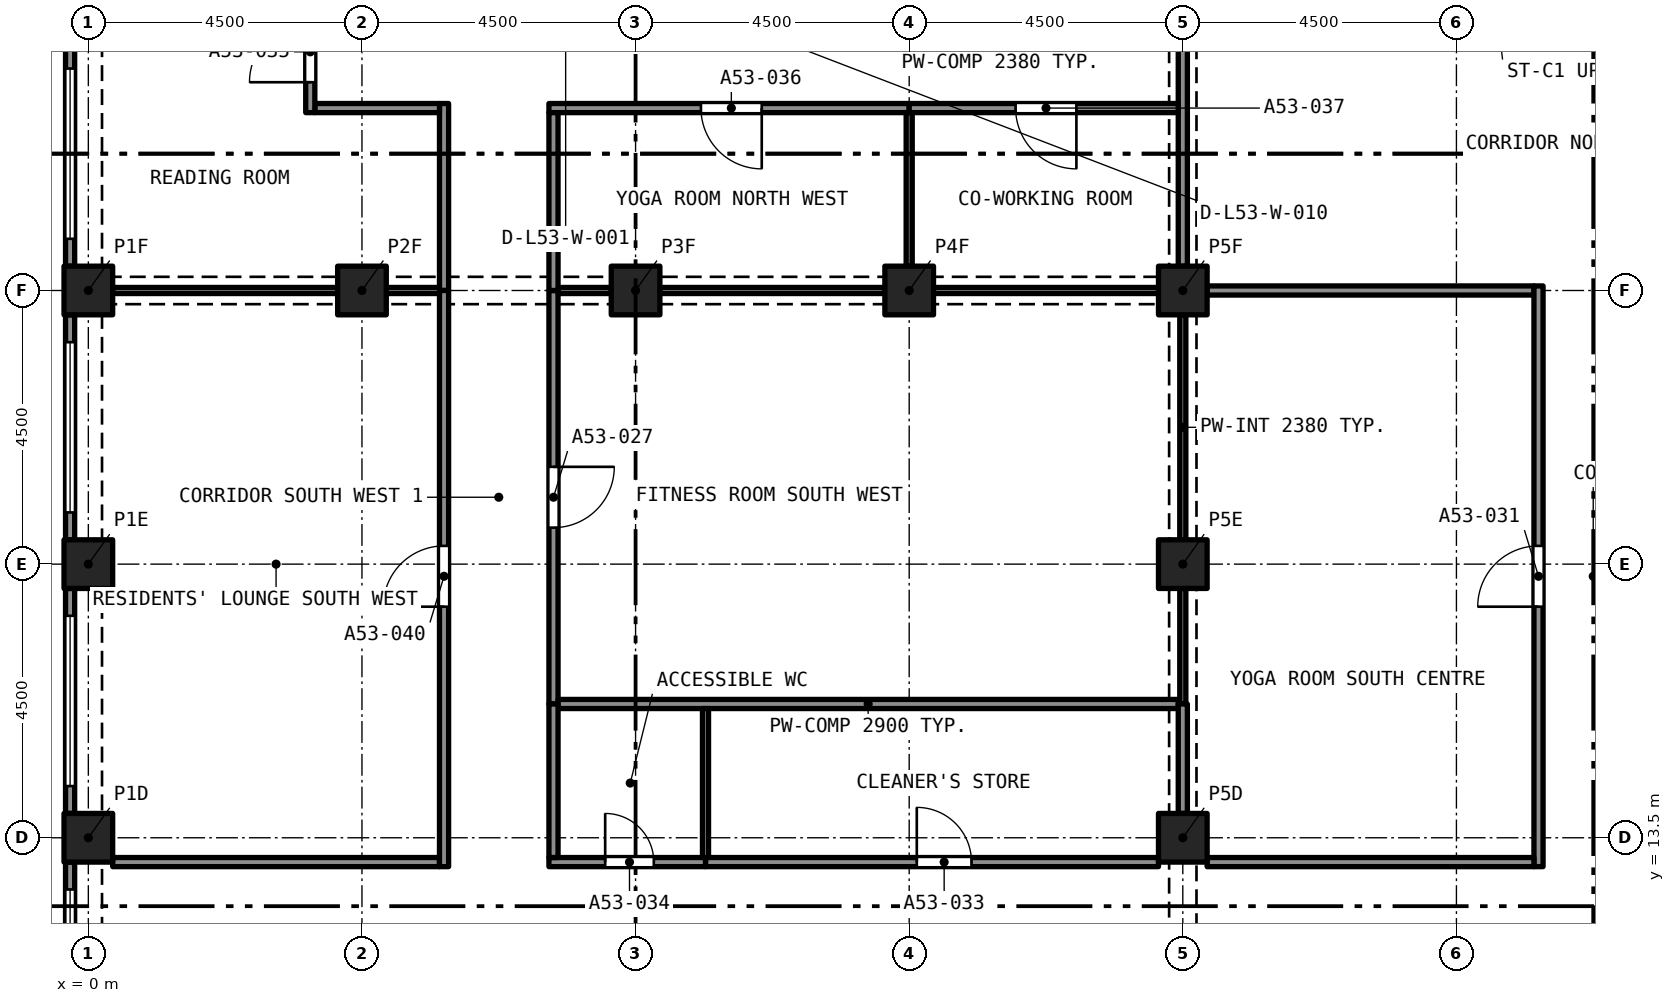
"""IFC4 building model, lengths in metres.
Left out: names, types, materials, properties, quantities, classifications, styles, units other than length and angle.
Written with IfcOpenShell. Run it as: python <this file> out.ifc"""

import sys

from ifc_helpers import new_model, si_unit, direction, frame, frame_2d, origin, origin_2d, place, context, subcontext, project, spatial, rectangle, extrude, element, fill, save


model = new_model("IFC4")
c1 = context("Model", 3, precision=1e-05, world=origin(), true_north=direction((0.0, 1.0)))
c2 = subcontext(c1, "Body", "Model", "MODEL_VIEW")
j1 = project(units=[si_unit("LENGTHUNIT", "METRE"), si_unit("PLANEANGLEUNIT", "RADIAN")], contexts=[c1])
p1 = place(None, origin())
s1 = spatial("IfcSite", under=j1, at=p1, CompositionType="ELEMENT")
p2 = place(p1, origin())
s2 = spatial("IfcBuilding", under=s1, at=p2, CompositionType="ELEMENT")
p3 = place(p2, frame((0.0, 0.0, 192.3)))
s3 = spatial("IfcBuildingStorey", under=s2, at=p3, CompositionType="ELEMENT", Elevation=192.3)
for number, where, z_axis, x_axis in (
    (1, (0.0, 13.5, 0.0), (0.0, 0.0, 1.0), (1.0, 0.0, 0.0)),
    (2, (18.0, 13.5, 0.0), (0.0, 0.0, 1.0), (1.0, 0.0, 0.0)),
    (3, (0.0, 18.0, 0.0), (0.0, 0.0, 1.0), (1.0, 0.0, 0.0)),
    (4, (18.0, 18.0, 0.0), (0.0, 0.0, 1.0), (1.0, 0.0, 0.0)),
    (5, (0.0, 22.5, 0.0), (0.0, 0.0, 1.0), (1.0, 0.0, 0.0)),
    (6, (4.5, 22.5, 0.0), (0.0, 0.0, 1.0), (1.0, 0.0, 0.0)),
    (7, (9.0, 22.5, 0.0), (0.0, 0.0, 1.0), (1.0, 0.0, 0.0)),
    (8, (13.5, 22.5, 0.0), (0.0, 0.0, 1.0), (1.0, 0.0, 0.0)),
    (9, (18.0, 22.5, 0.0), (0.0, 0.0, 1.0), (1.0, 0.0, 0.0)),
):
    element("IfcColumn", number, at=place(p3, frame(where, z_axis=z_axis, x_axis=x_axis)), inside=s3, PredefinedType="COLUMN", context=c2, shape_type="SweptSolid", body=[
        extrude(rectangle(XDim=0.8, YDim=0.8, at=origin_2d()), origin(), (0.0, 0.0, 1.0), 3.2),
    ])
p4 = place(p3, frame((-0.3, 22.9, 0.0), z_axis=(0.0, 0.0, 1.0), x_axis=(0.0, 1.0, 0.0)))
e10 = element("IfcWall", 10, at=p4, inside=s3, PredefinedType="SOLIDWALL", context=c2, shape_type="SweptSolid", body=[
    extrude(rectangle(XDim=3.7, YDim=0.15, at=frame_2d((1.85, 0.0))), origin(), (0.0, 0.0, 1.0), 3.2),
])
p5 = place(p4, frame((0.45, 0.0, 0.45)))
e11 = element("IfcOpeningElement", 11, at=p5, cuts=e10, PredefinedType="OPENING", context=c2, shape_type="SweptSolid", body=[
    extrude(rectangle(XDim=2.8, YDim=1.95, at=frame_2d((1.4, 0.975))), frame((0.0, 0.085, 0.0), z_axis=(0.0, -1.0, 0.0), x_axis=(1.0, 0.0, 0.0)), (0.0, 0.0, 1.0), 0.17),
])
p6 = place(p3, frame((-0.3, 18.4, 0.0), z_axis=(0.0, 0.0, 1.0), x_axis=(0.0, 1.0, 0.0)))
e12 = element("IfcWall", 12, at=p6, inside=s3, PredefinedType="SOLIDWALL", context=c2, shape_type="SweptSolid", body=[
    extrude(rectangle(XDim=3.7, YDim=0.15, at=frame_2d((1.85, 0.0))), origin(), (0.0, 0.0, 1.0), 3.2),
])
p7 = place(p6, frame((0.45, 0.0, 0.45)))
e13 = element("IfcOpeningElement", 13, at=p7, cuts=e12, PredefinedType="OPENING", context=c2, shape_type="SweptSolid", body=[
    extrude(rectangle(XDim=2.8, YDim=1.95, at=frame_2d((1.4, 0.975))), frame((0.0, 0.085, 0.0), z_axis=(0.0, -1.0, 0.0), x_axis=(1.0, 0.0, 0.0)), (0.0, 0.0, 1.0), 0.17),
])
p8 = place(p3, frame((-0.3, 13.9, 0.0), z_axis=(0.0, 0.0, 1.0), x_axis=(0.0, 1.0, 0.0)))
e14 = element("IfcWall", 14, at=p8, inside=s3, PredefinedType="SOLIDWALL", context=c2, shape_type="SweptSolid", body=[
    extrude(rectangle(XDim=3.7, YDim=0.15, at=frame_2d((1.85, 0.0))), origin(), (0.0, 0.0, 1.0), 3.2),
])
p9 = place(p8, frame((0.45, 0.0, 0.45)))
e15 = element("IfcOpeningElement", 15, at=p9, cuts=e14, PredefinedType="OPENING", context=c2, shape_type="SweptSolid", body=[
    extrude(rectangle(XDim=2.8, YDim=1.95, at=frame_2d((1.4, 0.975))), frame((0.0, 0.085, 0.0), z_axis=(0.0, -1.0, 0.0), x_axis=(1.0, 0.0, 0.0)), (0.0, 0.0, 1.0), 0.17),
])
p10 = place(p3, frame((-0.3, 9.4, 0.0), z_axis=(0.0, 0.0, 1.0), x_axis=(0.0, 1.0, 0.0)))
e16 = element("IfcWall", 16, at=p10, inside=s3, PredefinedType="SOLIDWALL", context=c2, shape_type="SweptSolid", body=[
    extrude(rectangle(XDim=3.7, YDim=0.15, at=frame_2d((1.85, 0.0))), origin(), (0.0, 0.0, 1.0), 3.2),
])
p11 = place(p10, frame((0.45, 0.0, 0.45)))
e17 = element("IfcOpeningElement", 17, at=p11, cuts=e16, PredefinedType="OPENING", context=c2, shape_type="SweptSolid", body=[
    extrude(rectangle(XDim=2.8, YDim=1.95, at=frame_2d((1.4, 0.975))), frame((0.0, 0.085, 0.0), z_axis=(0.0, -1.0, 0.0), x_axis=(1.0, 0.0, 0.0)), (0.0, 0.0, 1.0), 0.17),
])
p12 = place(p3, frame((18.0, 18.4, 0.0), z_axis=(0.0, 0.0, 1.0), x_axis=(0.0, 1.0, 0.0)))
e18 = element("IfcWall", 18, at=p12, inside=s3, PredefinedType="PARTITIONING", context=c2, shape_type="SweptSolid", body=[
    extrude(rectangle(XDim=3.7, YDim=0.1, at=frame_2d((1.85, 0.0))), origin(), (0.0, 0.0, 1.0), 2.38),
])
p13 = place(p3, frame((18.0, 15.7, 0.0), z_axis=(0.0, 0.0, 1.0), x_axis=(0.0, 1.0, 0.0)))
e19 = element("IfcWall", 19, at=p13, inside=s3, PredefinedType="PARTITIONING", context=c2, shape_type="SweptSolid", body=[
    extrude(rectangle(XDim=1.9, YDim=0.1, at=frame_2d((0.95, 0.0))), origin(), (0.0, 0.0, 1.0), 2.38),
])
p14 = place(p3, frame((7.65, 22.5, 0.0), z_axis=(0.0, 0.0, 1.0), x_axis=(0.0, -1.0, 0.0)))
e20 = element("IfcWall", 20, at=p14, inside=s3, PredefinedType="PARTITIONING", context=c2, shape_type="SweptSolid", body=[
    extrude(rectangle(XDim=6.8, YDim=0.15, at=frame_2d((3.4, 0.0))), origin(), (0.0, 0.0, 1.0), 2.9),
])
p15 = place(p14, frame((2.9, 0.0, 0.0)))
e21 = element("IfcOpeningElement", 21, at=p15, cuts=e20, PredefinedType="OPENING", context=c2, shape_type="SweptSolid", body=[
    extrude(rectangle(XDim=1.0, YDim=2.1, at=frame_2d((0.5, 1.05))), frame((0.0, 0.085, 0.0), z_axis=(0.0, -1.0, 0.0), x_axis=(1.0, 0.0, 0.0)), (0.0, 0.0, 1.0), 0.17),
])
p16 = place(p3, frame((7.725, 22.5, 0.0), z_axis=(0.0, 0.0, 1.0), x_axis=(1.0, 0.0, 0.0)))
e22 = element("IfcWall", 22, at=p16, inside=s3, PredefinedType="PARTITIONING", context=c2, shape_type="SweptSolid", body=[
    extrude(rectangle(XDim=0.875, YDim=0.1, at=frame_2d((0.438, 0.0))), origin(), (0.0, 0.0, 1.0), 2.38),
])
for number, where, z_axis, x_axis in (
    (23, (9.4, 22.5, 0.0), (0.0, 0.0, 1.0), (1.0, 0.0, 0.0)),
    (24, (13.9, 22.5, 0.0), (0.0, 0.0, 1.0), (1.0, 0.0, 0.0)),
):
    element("IfcWall", number, at=place(p3, frame(where, z_axis=z_axis, x_axis=x_axis)), inside=s3, PredefinedType="PARTITIONING", context=c2, shape_type="SweptSolid", body=[
        extrude(rectangle(XDim=3.7, YDim=0.1, at=frame_2d((1.85, 0.0))), origin(), (0.0, 0.0, 1.0), 2.38),
    ])
p17 = place(p3, frame((7.725, 15.7, 0.0), z_axis=(0.0, 0.0, 1.0), x_axis=(1.0, 0.0, 0.0)))
e25 = element("IfcWall", 25, at=p17, inside=s3, PredefinedType="PARTITIONING", context=c2, shape_type="SweptSolid", body=[
    extrude(rectangle(XDim=10.2, YDim=0.15, at=frame_2d((5.1, 0.0))), origin(), (0.0, 0.0, 1.0), 2.9),
])
p18 = place(p3, frame((18.4, 22.5, 0.0), z_axis=(0.0, 0.0, 1.0), x_axis=(1.0, 0.0, 0.0)))
e26 = element("IfcWall", 26, at=p18, inside=s3, PredefinedType="PARTITIONING", context=c2, shape_type="SweptSolid", body=[
    extrude(rectangle(XDim=5.375, YDim=0.15, at=frame_2d((2.688, 0.0))), origin(), (0.0, 0.0, 1.0), 2.75),
])
p19 = place(p3, frame((18.0, 22.9, 0.0), z_axis=(0.0, 0.0, 1.0), x_axis=(0.0, 1.0, 0.0)))
e27 = element("IfcWall", 27, at=p19, inside=s3, PredefinedType="PARTITIONING", context=c2, shape_type="SweptSolid", body=[
    extrude(rectangle(XDim=3.7, YDim=0.15, at=frame_2d((1.85, 0.0))), origin(), (0.0, 0.0, 1.0), 2.38),
])
p20 = place(p3, frame((23.85, 13.025, 0.0), z_axis=(0.0, 0.0, 1.0), x_axis=(0.0, 1.0, 0.0)))
e28 = element("IfcWall", 28, at=p20, inside=s3, PredefinedType="PARTITIONING", context=c2, shape_type="SweptSolid", body=[
    extrude(rectangle(XDim=9.55, YDim=0.15, at=frame_2d((4.775, 0.0))), origin(), (0.0, 0.0, 1.0), 2.75),
])
p21 = place(p20, frame((4.275, 0.0, 0.0)))
e29 = element("IfcOpeningElement", 29, at=p21, cuts=e28, PredefinedType="OPENING", context=c2, shape_type="SweptSolid", body=[
    extrude(rectangle(XDim=1.0, YDim=2.1, at=frame_2d((0.5, 1.05))), frame((0.0, 0.085, 0.0), z_axis=(0.0, -1.0, 0.0), x_axis=(1.0, 0.0, 0.0)), (0.0, 0.0, 1.0), 0.17),
])
p22 = place(p3, frame((18.4, 13.1, 0.0), z_axis=(0.0, 0.0, 1.0), x_axis=(1.0, 0.0, 0.0)))
e30 = element("IfcWall", 30, at=p22, inside=s3, PredefinedType="PARTITIONING", context=c2, shape_type="SweptSolid", body=[
    extrude(rectangle(XDim=5.375, YDim=0.15, at=frame_2d((2.688, 0.0))), origin(), (0.0, 0.0, 1.0), 2.75),
])
p23 = place(p3, frame((10.15, 13.1, 0.0), z_axis=(0.0, 0.0, 1.0), x_axis=(1.0, 0.0, 0.0)))
e31 = element("IfcWall", 31, at=p23, inside=s3, PredefinedType="PARTITIONING", context=c2, shape_type="SweptSolid", body=[
    extrude(rectangle(XDim=7.45, YDim=0.15, at=frame_2d((3.725, 0.0))), origin(), (0.0, 0.0, 1.0), 2.9),
])
p24 = place(p23, frame((3.475, 0.0, 0.0)))
e32 = element("IfcOpeningElement", 32, at=p24, cuts=e31, PredefinedType="OPENING", context=c2, shape_type="SweptSolid", body=[
    extrude(rectangle(XDim=0.9, YDim=2.1, at=frame_2d((0.45, 1.05))), frame((0.0, 0.085, 0.0), z_axis=(0.0, -1.0, 0.0), x_axis=(1.0, 0.0, 0.0)), (0.0, 0.0, 1.0), 0.17),
])
p25 = place(p3, frame((7.575, 13.1, 0.0), z_axis=(0.0, 0.0, 1.0), x_axis=(1.0, 0.0, 0.0)))
e33 = element("IfcWall", 33, at=p25, inside=s3, PredefinedType="PARTITIONING", context=c2, shape_type="SweptSolid", body=[
    extrude(rectangle(XDim=2.575, YDim=0.15, at=frame_2d((1.288, 0.0))), origin(), (0.0, 0.0, 1.0), 2.9),
])
p26 = place(p25, frame((0.925, 0.0, 0.0)))
e34 = element("IfcOpeningElement", 34, at=p26, cuts=e33, PredefinedType="OPENING", context=c2, shape_type="SweptSolid", body=[
    extrude(rectangle(XDim=0.8, YDim=2.1, at=frame_2d((0.4, 1.05))), frame((0.0, 0.085, 0.0), z_axis=(0.0, -1.0, 0.0), x_axis=(1.0, 0.0, 0.0)), (0.0, 0.0, 1.0), 0.17),
])
p27 = place(p3, frame((0.4, 13.1, 0.0), z_axis=(0.0, 0.0, 1.0), x_axis=(1.0, 0.0, 0.0)))
e35 = element("IfcWall", 35, at=p27, inside=s3, PredefinedType="PARTITIONING", context=c2, shape_type="SweptSolid", body=[
    extrude(rectangle(XDim=5.375, YDim=0.15, at=frame_2d((2.688, 0.0))), origin(), (0.0, 0.0, 1.0), 2.9),
])
p28 = place(p3, frame((18.0, 13.9, 0.0), z_axis=(0.0, 0.0, 1.0), x_axis=(0.0, 1.0, 0.0)))
e36 = element("IfcWall", 36, at=p28, inside=s3, PredefinedType="PARTITIONING", context=c2, shape_type="SweptSolid", body=[
    extrude(rectangle(XDim=1.8, YDim=0.15, at=frame_2d((0.9, 0.0))), origin(), (0.0, 0.0, 1.0), 2.38),
])
p29 = place(p3, frame((5.85, 22.5, 0.0), z_axis=(0.0, 0.0, 1.0), x_axis=(0.0, 1.0, 0.0)))
e37 = element("IfcWall", 37, at=p29, inside=s3, PredefinedType="PARTITIONING", context=c2, shape_type="SweptSolid", body=[
    extrude(rectangle(XDim=3.075, YDim=0.15, at=frame_2d((1.538, 0.0))), origin(), (0.0, 0.0, 1.0), 2.9),
])
p30 = place(p3, frame((3.725, 25.5, 0.0), z_axis=(0.0, 0.0, 1.0), x_axis=(1.0, 0.0, 0.0)))
e38 = element("IfcWall", 38, at=p30, inside=s3, PredefinedType="PARTITIONING", context=c2, shape_type="SweptSolid", body=[
    extrude(rectangle(XDim=2.05, YDim=0.15, at=frame_2d((1.025, 0.0))), origin(), (0.0, 0.0, 1.0), 2.9),
])
p31 = place(p3, frame((3.65, 25.425, 0.0), z_axis=(0.0, 0.0, 1.0), x_axis=(0.0, 1.0, 0.0)))
e39 = element("IfcWall", 39, at=p31, inside=s3, PredefinedType="PARTITIONING", context=c2, shape_type="SweptSolid", body=[
    extrude(rectangle(XDim=1.925, YDim=0.15, at=frame_2d((0.962, 0.0))), origin(), (0.0, 0.0, 1.0), 2.9),
])
p32 = place(p31, frame((0.5, 0.0, 0.0)))
e40 = element("IfcOpeningElement", 40, at=p32, cuts=e39, PredefinedType="OPENING", context=c2, shape_type="SweptSolid", body=[
    extrude(rectangle(XDim=1.0, YDim=2.1, at=frame_2d((0.5, 1.05))), frame((0.0, 0.085, 0.0), z_axis=(0.0, -1.0, 0.0), x_axis=(1.0, 0.0, 0.0)), (0.0, 0.0, 1.0), 0.17),
])
p33 = place(p3, frame((13.5, 25.5, 0.0), z_axis=(0.0, 0.0, 1.0), x_axis=(-1.0, 0.0, 0.0)))
e41 = element("IfcWall", 41, at=p33, inside=s3, PredefinedType="PARTITIONING", context=c2, shape_type="SweptSolid", body=[
    extrude(rectangle(XDim=5.925, YDim=0.15, at=frame_2d((2.962, 0.0))), origin(), (0.0, 0.0, 1.0), 2.9),
])
p34 = place(p33, frame((2.425, 0.0, 0.0)))
e42 = element("IfcOpeningElement", 42, at=p34, cuts=e41, PredefinedType="OPENING", context=c2, shape_type="SweptSolid", body=[
    extrude(rectangle(XDim=1.0, YDim=2.1, at=frame_2d((0.5, 1.05))), frame((0.0, 0.085, 0.0), z_axis=(0.0, -1.0, 0.0), x_axis=(1.0, 0.0, 0.0)), (0.0, 0.0, 1.0), 0.17),
])
p35 = place(p3, frame((7.65, 22.5, 0.0), z_axis=(0.0, 0.0, 1.0), x_axis=(0.0, 1.0, 0.0)))
e43 = element("IfcWall", 43, at=p35, inside=s3, PredefinedType="PARTITIONING", context=c2, shape_type="SweptSolid", body=[
    extrude(rectangle(XDim=2.925, YDim=0.15, at=frame_2d((1.462, 0.0))), origin(), (0.0, 0.0, 1.0), 2.9),
])
p36 = place(p3, frame((17.925, 25.5, 0.0), z_axis=(0.0, 0.0, 1.0), x_axis=(-1.0, 0.0, 0.0)))
e44 = element("IfcWall", 44, at=p36, inside=s3, PredefinedType="PARTITIONING", context=c2, shape_type="SweptSolid", body=[
    extrude(rectangle(XDim=4.425, YDim=0.15, at=frame_2d((2.212, 0.0))), origin(), (0.0, 0.0, 1.0), 2.9),
])
p37 = place(p36, frame((1.675, 0.0, 0.0)))
e45 = element("IfcOpeningElement", 45, at=p37, cuts=e44, PredefinedType="OPENING", context=c2, shape_type="SweptSolid", body=[
    extrude(rectangle(XDim=1.0, YDim=2.1, at=frame_2d((0.5, 1.05))), frame((0.0, 0.085, 0.0), z_axis=(0.0, -1.0, 0.0), x_axis=(1.0, 0.0, 0.0)), (0.0, 0.0, 1.0), 0.17),
])
p38 = place(p3, frame((7.65, 13.175, 0.0), z_axis=(0.0, 0.0, 1.0), x_axis=(0.0, 1.0, 0.0)))
e46 = element("IfcWall", 46, at=p38, inside=s3, PredefinedType="PARTITIONING", context=c2, shape_type="SweptSolid", body=[
    extrude(rectangle(XDim=2.525, YDim=0.15, at=frame_2d((1.262, 0.0))), origin(), (0.0, 0.0, 1.0), 2.9),
])
p39 = place(p3, frame((5.85, 13.025, 0.0), z_axis=(0.0, 0.0, 1.0), x_axis=(0.0, 1.0, 0.0)))
e47 = element("IfcWall", 47, at=p39, inside=s3, PredefinedType="PARTITIONING", context=c2, shape_type="SweptSolid", body=[
    extrude(rectangle(XDim=9.475, YDim=0.15, at=frame_2d((4.738, 0.0))), origin(), (0.0, 0.0, 1.0), 2.9),
])
p40 = place(p39, frame((4.275, 0.0, 0.0)))
e48 = element("IfcOpeningElement", 48, at=p40, cuts=e47, PredefinedType="OPENING", context=c2, shape_type="SweptSolid", body=[
    extrude(rectangle(XDim=1.0, YDim=2.1, at=frame_2d((0.5, 1.05))), frame((0.0, 0.085, 0.0), z_axis=(0.0, -1.0, 0.0), x_axis=(1.0, 0.0, 0.0)), (0.0, 0.0, 1.0), 0.17),
])
p41 = place(p3, frame((4.9, 22.5, 0.0), z_axis=(0.0, 0.0, 1.0), x_axis=(1.0, 0.0, 0.0)))
e49 = element("IfcWall", 49, at=p41, inside=s3, PredefinedType="PARTITIONING", context=c2, shape_type="SweptSolid", body=[
    extrude(rectangle(XDim=0.875, YDim=0.1, at=frame_2d((0.438, 0.0))), origin(), (0.0, 0.0, 1.0), 2.38),
])
p42 = place(p3, frame((0.4, 22.5, 0.0), z_axis=(0.0, 0.0, 1.0), x_axis=(1.0, 0.0, 0.0)))
e50 = element("IfcWall", 50, at=p42, inside=s3, PredefinedType="PARTITIONING", context=c2, shape_type="SweptSolid", body=[
    extrude(rectangle(XDim=3.7, YDim=0.1, at=frame_2d((1.85, 0.0))), origin(), (0.0, 0.0, 1.0), 2.38),
])
p43 = place(p3, frame((13.5, 22.9, 0.0), z_axis=(0.0, 0.0, 1.0), x_axis=(0.0, 1.0, 0.0)))
e51 = element("IfcWall", 51, at=p43, inside=s3, PredefinedType="PARTITIONING", context=c2, shape_type="SweptSolid", body=[
    extrude(rectangle(XDim=2.525, YDim=0.1, at=frame_2d((1.263, 0.0))), origin(), (0.0, 0.0, 1.0), 2.9),
])
p44 = place(p3, frame((10.15, 13.175, 0.0), z_axis=(0.0, 0.0, 1.0), x_axis=(0.0, 1.0, 0.0)))
e52 = element("IfcWall", 52, at=p44, inside=s3, PredefinedType="PARTITIONING", context=c2, shape_type="SweptSolid", body=[
    extrude(rectangle(XDim=2.45, YDim=0.1, at=frame_2d((1.225, 0.0))), origin(), (0.0, 0.0, 1.0), 2.9),
])
p45 = place(p5, origin())
e53 = element("IfcWindow", 53, at=p45, inside=s3, PartitioningType="SINGLE_PANEL", PredefinedType="WINDOW", context=c2, shape_type="SweptSolid", body=[
    extrude(rectangle(XDim=2.8, YDim=1.95, at=frame_2d((1.4, 0.975))), frame((0.0, 0.03, 0.0), z_axis=(0.0, -1.0, 0.0), x_axis=(1.0, 0.0, 0.0)), (0.0, 0.0, 1.0), 0.06),
])
fill(e11, e53)
p46 = place(p7, origin())
e54 = element("IfcWindow", 54, at=p46, inside=s3, PartitioningType="SINGLE_PANEL", PredefinedType="WINDOW", context=c2, shape_type="SweptSolid", body=[
    extrude(rectangle(XDim=2.8, YDim=1.95, at=frame_2d((1.4, 0.975))), frame((0.0, 0.03, 0.0), z_axis=(0.0, -1.0, 0.0), x_axis=(1.0, 0.0, 0.0)), (0.0, 0.0, 1.0), 0.06),
])
fill(e13, e54)
p47 = place(p9, origin())
e55 = element("IfcWindow", 55, at=p47, inside=s3, PartitioningType="SINGLE_PANEL", PredefinedType="WINDOW", context=c2, shape_type="SweptSolid", body=[
    extrude(rectangle(XDim=2.8, YDim=1.95, at=frame_2d((1.4, 0.975))), frame((0.0, 0.03, 0.0), z_axis=(0.0, -1.0, 0.0), x_axis=(1.0, 0.0, 0.0)), (0.0, 0.0, 1.0), 0.06),
])
fill(e15, e55)
p48 = place(p11, origin())
e56 = element("IfcWindow", 56, at=p48, inside=s3, PartitioningType="SINGLE_PANEL", PredefinedType="WINDOW", context=c2, shape_type="SweptSolid", body=[
    extrude(rectangle(XDim=2.8, YDim=1.95, at=frame_2d((1.4, 0.975))), frame((0.0, 0.03, 0.0), z_axis=(0.0, -1.0, 0.0), x_axis=(1.0, 0.0, 0.0)), (0.0, 0.0, 1.0), 0.06),
])
fill(e17, e56)
p49 = place(p15, origin())
e57 = element("IfcDoor", 57, at=p49, inside=s3, OperationType="SINGLE_SWING_LEFT", PredefinedType="DOOR", context=c2, shape_type="SweptSolid", body=[
    extrude(rectangle(XDim=1.0, YDim=2.1, at=frame_2d((0.5, 1.05))), frame((0.0, 0.025, 0.0), z_axis=(0.0, -1.0, 0.0), x_axis=(1.0, 0.0, 0.0)), (0.0, 0.0, 1.0), 0.05),
])
fill(e21, e57)
p50 = place(p21, origin())
e58 = element("IfcDoor", 58, at=p50, inside=s3, OperationType="SINGLE_SWING_RIGHT", PredefinedType="DOOR", context=c2, shape_type="SweptSolid", body=[
    extrude(rectangle(XDim=1.0, YDim=2.1, at=frame_2d((0.5, 1.05))), frame((0.0, 0.025, 0.0), z_axis=(0.0, -1.0, 0.0), x_axis=(1.0, 0.0, 0.0)), (0.0, 0.0, 1.0), 0.05),
])
fill(e29, e58)
p51 = place(p24, origin())
e59 = element("IfcDoor", 59, at=p51, inside=s3, OperationType="SINGLE_SWING_RIGHT", PredefinedType="DOOR", context=c2, shape_type="SweptSolid", body=[
    extrude(rectangle(XDim=0.9, YDim=2.1, at=frame_2d((0.45, 1.05))), frame((0.0, 0.025, 0.0), z_axis=(0.0, -1.0, 0.0), x_axis=(1.0, 0.0, 0.0)), (0.0, 0.0, 1.0), 0.05),
])
fill(e32, e59)
p52 = place(p26, origin())
e60 = element("IfcDoor", 60, at=p52, inside=s3, OperationType="SINGLE_SWING_RIGHT", PredefinedType="DOOR", context=c2, shape_type="SweptSolid", body=[
    extrude(rectangle(XDim=0.8, YDim=2.1, at=frame_2d((0.4, 1.05))), frame((0.0, 0.025, 0.0), z_axis=(0.0, -1.0, 0.0), x_axis=(1.0, 0.0, 0.0)), (0.0, 0.0, 1.0), 0.05),
])
fill(e34, e60)
p53 = place(p32, origin())
e61 = element("IfcDoor", 61, at=p53, inside=s3, OperationType="SINGLE_SWING_RIGHT", PredefinedType="DOOR", context=c2, shape_type="SweptSolid", body=[
    extrude(rectangle(XDim=1.0, YDim=2.1, at=frame_2d((0.5, 1.05))), frame((0.0, 0.025, 0.0), z_axis=(0.0, -1.0, 0.0), x_axis=(1.0, 0.0, 0.0)), (0.0, 0.0, 1.0), 0.05),
])
fill(e40, e61)
p54 = place(p34, origin())
e62 = element("IfcDoor", 62, at=p54, inside=s3, OperationType="SINGLE_SWING_LEFT", PredefinedType="DOOR", context=c2, shape_type="SweptSolid", body=[
    extrude(rectangle(XDim=1.0, YDim=2.1, at=frame_2d((0.5, 1.05))), frame((0.0, 0.025, 0.0), z_axis=(0.0, -1.0, 0.0), x_axis=(1.0, 0.0, 0.0)), (0.0, 0.0, 1.0), 0.05),
])
fill(e42, e62)
p55 = place(p37, origin())
e63 = element("IfcDoor", 63, at=p55, inside=s3, OperationType="SINGLE_SWING_LEFT", PredefinedType="DOOR", context=c2, shape_type="SweptSolid", body=[
    extrude(rectangle(XDim=1.0, YDim=2.1, at=frame_2d((0.5, 1.05))), frame((0.0, 0.025, 0.0), z_axis=(0.0, -1.0, 0.0), x_axis=(1.0, 0.0, 0.0)), (0.0, 0.0, 1.0), 0.05),
])
fill(e45, e63)
p56 = place(p40, origin())
e64 = element("IfcDoor", 64, at=p56, inside=s3, OperationType="SINGLE_SWING_RIGHT", PredefinedType="DOOR", context=c2, shape_type="SweptSolid", body=[
    extrude(rectangle(XDim=1.0, YDim=2.1, at=frame_2d((0.5, 1.05))), frame((0.0, 0.025, 0.0), z_axis=(0.0, -1.0, 0.0), x_axis=(1.0, 0.0, 0.0)), (0.0, 0.0, 1.0), 0.05),
])
fill(e48, e64)
save(model, sys.argv[1])
